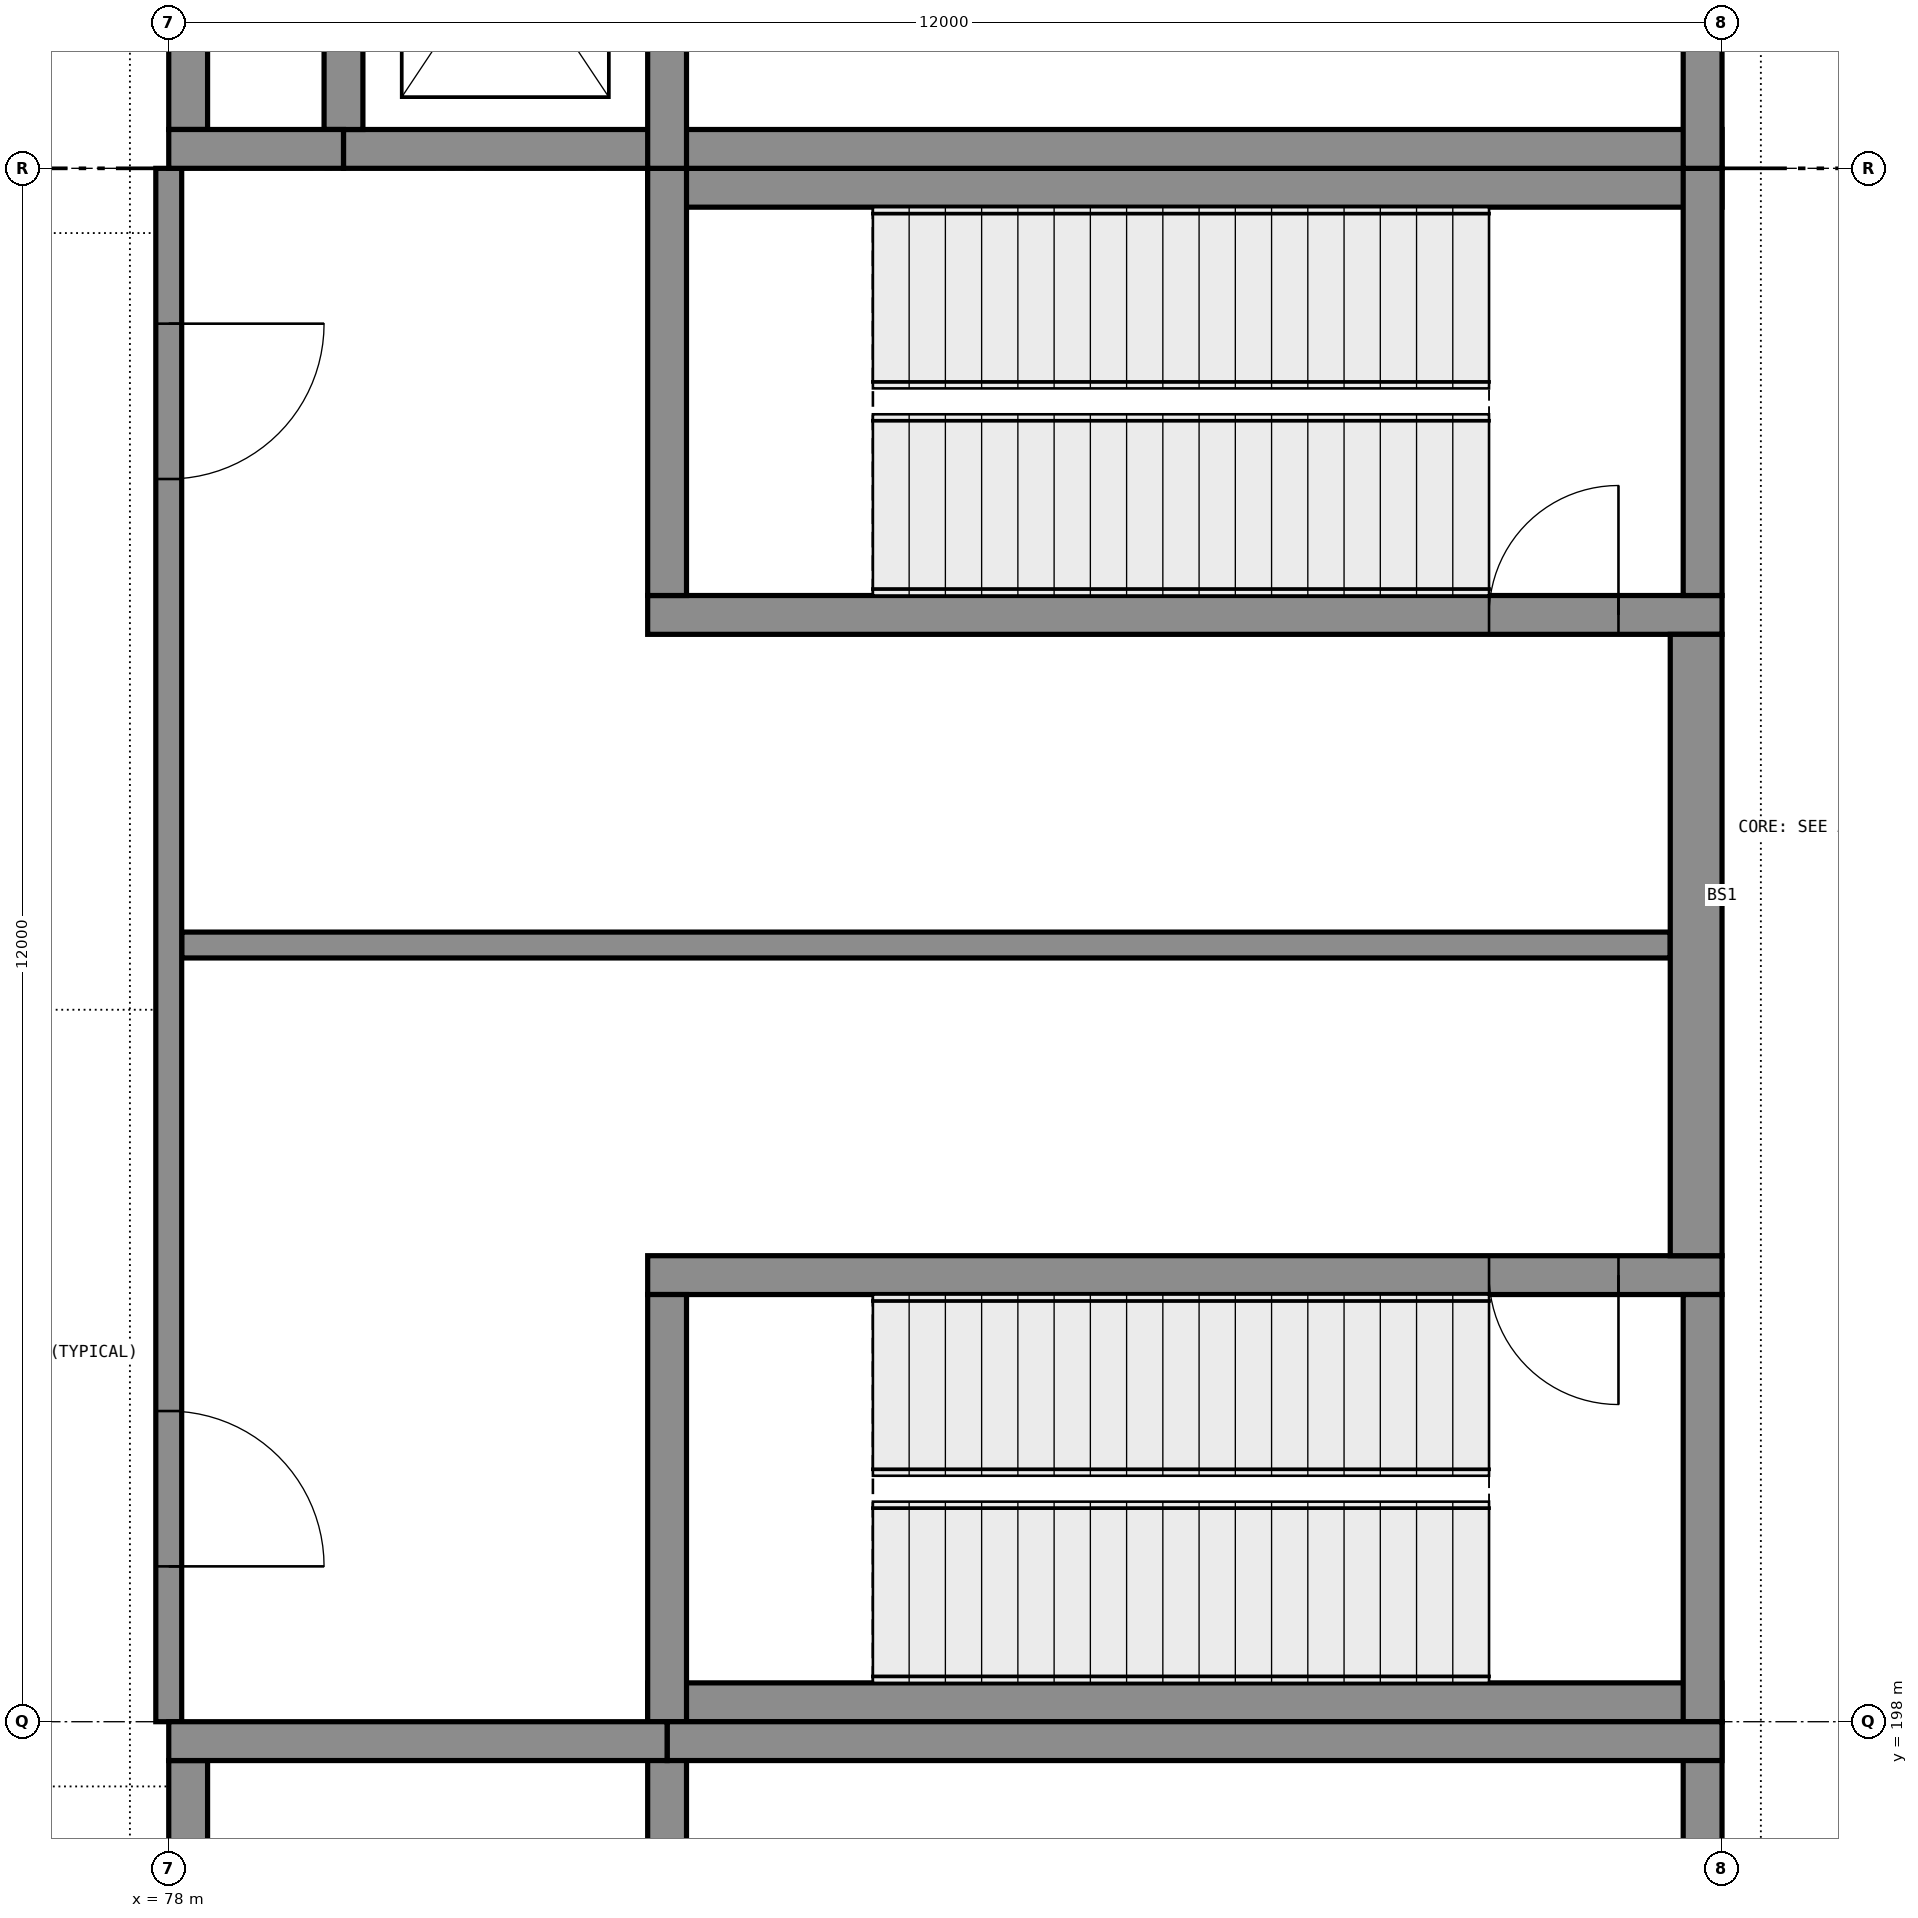
"""IFC4 building model, lengths in metres.
Left out: names, types, materials, properties, quantities, classifications, styles, units other than length and angle.
Written with IfcOpenShell. Run it as: python <this file> out.ifc"""

import sys

from ifc_helpers import new_model, si_unit, direction, frame, frame_2d, origin, place, context, subcontext, project, spatial, rectangle, extrude, element, fill, save


model = new_model("IFC4")
c1 = context("Model", 3, precision=1e-05, world=origin(), true_north=direction((0.0, 1.0)))
c2 = subcontext(c1, "Body", "Model", "MODEL_VIEW")
j1 = project(units=[si_unit("LENGTHUNIT", "METRE"), si_unit("PLANEANGLEUNIT", "RADIAN")], contexts=[c1])
p1 = place(None, origin())
s1 = spatial("IfcSite", under=j1, at=p1, CompositionType="ELEMENT")
p2 = place(p1, origin())
s2 = spatial("IfcBuilding", under=s1, at=p2, CompositionType="ELEMENT")
p3 = place(p2, frame((0.0, 0.0, -6.0)))
s3 = spatial("IfcBuildingStorey", under=s2, at=p3, CompositionType="ELEMENT", Elevation=-6.0)
p4 = place(p3, frame((90.0, 198.15, 0.0), z_axis=(0.0, 0.0, 1.0), x_axis=(-1.0, 0.0, 0.0)))
e1 = element("IfcWall", 1, at=p4, inside=s3, PredefinedType="SHEAR", context=c2, shape_type="SweptSolid", body=[
    extrude(rectangle(XDim=8.3, YDim=0.3, at=frame_2d((4.15, 0.0))), origin(), (0.0, 0.0, 1.0), 5.7),
])
p5 = place(p3, frame((90.0, 201.45, 0.0), z_axis=(0.0, 0.0, 1.0), x_axis=(-1.0, 0.0, 0.0)))
e2 = element("IfcWall", 2, at=p5, inside=s3, PredefinedType="SHEAR", context=c2, shape_type="SweptSolid", body=[
    extrude(rectangle(XDim=8.3, YDim=0.3, at=frame_2d((4.15, 0.0))), origin(), (0.0, 0.0, 1.0), 5.7),
])
p6 = place(p5, frame((0.8, 0.0, 0.0)))
e3 = element("IfcOpeningElement", 3, at=p6, cuts=e2, PredefinedType="OPENING", context=c2, shape_type="SweptSolid", body=[
    extrude(rectangle(XDim=1.0, YDim=2.1, at=frame_2d((0.5, 1.05))), frame((0.0, 0.16, 0.0), z_axis=(0.0, -1.0, 0.0), x_axis=(1.0, 0.0, 0.0)), (0.0, 0.0, 1.0), 0.32),
])
for number, where, z_axis, x_axis in (
    (4, (89.85, 198.0, 0.0), (0.0, 0.0, 1.0), (0.0, 1.0, 0.0)),
    (5, (81.85, 198.0, 0.0), (0.0, 0.0, 1.0), (0.0, 1.0, 0.0)),
):
    element("IfcWall", number, at=place(p3, frame(where, z_axis=z_axis, x_axis=x_axis)), inside=s3, PredefinedType="SHEAR", context=c2, shape_type="SweptSolid", body=[
        extrude(rectangle(XDim=3.3, YDim=0.3, at=frame_2d((1.65, 0.0))), origin(), (0.0, 0.0, 1.0), 5.7),
    ])
p7 = place(p3, frame((90.0, 206.55, 0.0), z_axis=(0.0, 0.0, 1.0), x_axis=(-1.0, 0.0, 0.0)))
e6 = element("IfcWall", 6, at=p7, inside=s3, PredefinedType="SHEAR", context=c2, shape_type="SweptSolid", body=[
    extrude(rectangle(XDim=8.3, YDim=0.3, at=frame_2d((4.15, 0.0))), origin(), (0.0, 0.0, 1.0), 5.7),
])
p8 = place(p7, frame((0.8, 0.0, 0.0)))
e7 = element("IfcOpeningElement", 7, at=p8, cuts=e6, PredefinedType="OPENING", context=c2, shape_type="SweptSolid", body=[
    extrude(rectangle(XDim=1.0, YDim=2.1, at=frame_2d((0.5, 1.05))), frame((0.0, 0.16, 0.0), z_axis=(0.0, -1.0, 0.0), x_axis=(1.0, 0.0, 0.0)), (0.0, 0.0, 1.0), 0.32),
])
p9 = place(p3, frame((90.0, 209.85, 0.0), z_axis=(0.0, 0.0, 1.0), x_axis=(-1.0, 0.0, 0.0)))
e8 = element("IfcWall", 8, at=p9, inside=s3, PredefinedType="SHEAR", context=c2, shape_type="SweptSolid", body=[
    extrude(rectangle(XDim=8.3, YDim=0.3, at=frame_2d((4.15, 0.0))), origin(), (0.0, 0.0, 1.0), 5.7),
])
for number, where, z_axis, x_axis in (
    (9, (89.85, 206.7, 0.0), (0.0, 0.0, 1.0), (0.0, 1.0, 0.0)),
    (10, (81.85, 206.7, 0.0), (0.0, 0.0, 1.0), (0.0, 1.0, 0.0)),
):
    element("IfcWall", number, at=place(p3, frame(where, z_axis=z_axis, x_axis=x_axis)), inside=s3, PredefinedType="SHEAR", context=c2, shape_type="SweptSolid", body=[
        extrude(rectangle(XDim=3.3, YDim=0.3, at=frame_2d((1.65, 0.0))), origin(), (0.0, 0.0, 1.0), 5.7),
    ])
p10 = place(p3, frame((90.0, 197.85, 0.0), z_axis=(0.0, 0.0, 1.0), x_axis=(-1.0, 0.0, 0.0)))
e11 = element("IfcWall", 11, at=p10, inside=s3, PredefinedType="SHEAR", context=c2, shape_type="SweptSolid", body=[
    extrude(rectangle(XDim=8.15, YDim=0.3, at=frame_2d((4.075, 0.0))), origin(), (0.0, 0.0, 1.0), 5.7),
])
p11 = place(p3, frame((81.85, 197.85, 0.0), z_axis=(0.0, 0.0, 1.0), x_axis=(-1.0, 0.0, 0.0)))
e12 = element("IfcWall", 12, at=p11, inside=s3, PredefinedType="SHEAR", context=c2, shape_type="SweptSolid", body=[
    extrude(rectangle(XDim=3.85, YDim=0.3, at=frame_2d((1.925, 0.0))), origin(), (0.0, 0.0, 1.0), 5.7),
])
p12 = place(p3, frame((89.85, 194.55, 0.0), z_axis=(0.0, 0.0, 1.0), x_axis=(0.0, 1.0, 0.0)))
e13 = element("IfcWall", 13, at=p12, inside=s3, PredefinedType="SHEAR", context=c2, shape_type="SweptSolid", body=[
    extrude(rectangle(XDim=3.45, YDim=0.3, at=frame_2d((1.725, 0.0))), origin(), (0.0, 0.0, 1.0), 5.7),
])
p13 = place(p3, frame((78.15, 194.55, 0.0), z_axis=(0.0, 0.0, 1.0), x_axis=(0.0, 1.0, 0.0)))
e14 = element("IfcWall", 14, at=p13, inside=s3, PredefinedType="SHEAR", context=c2, shape_type="SweptSolid", body=[
    extrude(rectangle(XDim=3.15, YDim=0.3, at=frame_2d((1.575, 0.0))), origin(), (0.0, 0.0, 1.0), 5.7),
])
p14 = place(p13, frame((1.15, 0.0, 0.0)))
e15 = element("IfcOpeningElement", 15, at=p14, cuts=e14, PredefinedType="OPENING", context=c2, shape_type="SweptSolid", body=[
    extrude(rectangle(XDim=1.0, YDim=2.1, at=frame_2d((0.5, 1.05))), frame((0.0, 0.16, 0.0), z_axis=(0.0, -1.0, 0.0), x_axis=(1.0, 0.0, 0.0)), (0.0, 0.0, 1.0), 0.32),
])
p15 = place(p3, frame((81.85, 194.7, 0.0), z_axis=(0.0, 0.0, 1.0), x_axis=(0.0, 1.0, 0.0)))
e16 = element("IfcWall", 16, at=p15, inside=s3, PredefinedType="SHEAR", context=c2, shape_type="SweptSolid", body=[
    extrude(rectangle(XDim=3.3, YDim=0.3, at=frame_2d((1.65, 0.0))), origin(), (0.0, 0.0, 1.0), 5.7),
])
p16 = place(p3, frame((90.0, 210.15, 0.0), z_axis=(0.0, 0.0, 1.0), x_axis=(-1.0, 0.0, 0.0)))
e17 = element("IfcWall", 17, at=p16, inside=s3, PredefinedType="SHEAR", context=c2, shape_type="SweptSolid", body=[
    extrude(rectangle(XDim=8.15, YDim=0.3, at=frame_2d((4.075, 0.0))), origin(), (0.0, 0.0, 1.0), 5.7),
])
p17 = place(p3, frame((81.85, 210.15, 0.0), z_axis=(0.0, 0.0, 1.0), x_axis=(-1.0, 0.0, 0.0)))
e18 = element("IfcWall", 18, at=p17, inside=s3, PredefinedType="SHEAR", context=c2, shape_type="SweptSolid", body=[
    extrude(rectangle(XDim=2.5, YDim=0.3, at=frame_2d((1.25, 0.0))), origin(), (0.0, 0.0, 1.0), 5.7),
])
p18 = place(p3, frame((79.35, 210.15, 0.0), z_axis=(0.0, 0.0, 1.0), x_axis=(-1.0, 0.0, 0.0)))
e19 = element("IfcWall", 19, at=p18, inside=s3, PredefinedType="SHEAR", context=c2, shape_type="SweptSolid", body=[
    extrude(rectangle(XDim=1.35, YDim=0.3, at=frame_2d((0.675, 0.0))), origin(), (0.0, 0.0, 1.0), 5.7),
])
p19 = place(p3, frame((89.85, 210.0, 0.0), z_axis=(0.0, 0.0, 1.0), x_axis=(0.0, 1.0, 0.0)))
e20 = element("IfcWall", 20, at=p19, inside=s3, PredefinedType="SHEAR", context=c2, shape_type="SweptSolid", body=[
    extrude(rectangle(XDim=3.45, YDim=0.3, at=frame_2d((1.725, 0.0))), origin(), (0.0, 0.0, 1.0), 5.7),
])
p20 = place(p3, frame((78.15, 210.3, 0.0), z_axis=(0.0, 0.0, 1.0), x_axis=(0.0, 1.0, 0.0)))
e21 = element("IfcWall", 21, at=p20, inside=s3, PredefinedType="SHEAR", context=c2, shape_type="SweptSolid", body=[
    extrude(rectangle(XDim=3.15, YDim=0.3, at=frame_2d((1.575, 0.0))), origin(), (0.0, 0.0, 1.0), 5.7),
])
p21 = place(p3, frame((81.85, 210.0, 0.0), z_axis=(0.0, 0.0, 1.0), x_axis=(0.0, 1.0, 0.0)))
e22 = element("IfcWall", 22, at=p21, inside=s3, PredefinedType="SHEAR", context=c2, shape_type="SweptSolid", body=[
    extrude(rectangle(XDim=3.3, YDim=0.3, at=frame_2d((1.65, 0.0))), origin(), (0.0, 0.0, 1.0), 5.7),
])
p22 = place(p3, frame((79.35, 210.3, 0.0), z_axis=(0.0, 0.0, 1.0), x_axis=(0.0, 1.0, 0.0)))
e23 = element("IfcWall", 23, at=p22, inside=s3, PredefinedType="SHEAR", context=c2, shape_type="SweptSolid", body=[
    extrude(rectangle(XDim=3.0, YDim=0.3, at=frame_2d((1.5, 0.0))), origin(), (0.0, 0.0, 1.0), 5.7),
])
p23 = place(p3, frame((89.8, 201.6, 0.0), z_axis=(0.0, 0.0, 1.0), x_axis=(0.0, 1.0, 0.0)))
e24 = element("IfcWall", 24, at=p23, inside=s3, PredefinedType="SOLIDWALL", context=c2, shape_type="SweptSolid", body=[
    extrude(rectangle(XDim=4.8, YDim=0.4, at=frame_2d((2.4, 0.0))), origin(), (0.0, 0.0, 1.0), 5.7),
])
p24 = place(p3, frame((78.1, 204.0, 0.0), z_axis=(0.0, 0.0, 1.0), x_axis=(1.0, 0.0, 0.0)))
e25 = element("IfcWall", 25, at=p24, inside=s3, PredefinedType="PARTITIONING", context=c2, shape_type="SweptSolid", body=[
    extrude(rectangle(XDim=11.5, YDim=0.2, at=frame_2d((5.75, 0.0))), origin(), (0.0, 0.0, 1.0), 5.7),
])
p25 = place(p3, frame((78.0, 198.0, 0.0), z_axis=(0.0, 0.0, 1.0), x_axis=(0.0, 1.0, 0.0)))
e26 = element("IfcWall", 26, at=p25, inside=s3, PredefinedType="PARTITIONING", context=c2, shape_type="SweptSolid", body=[
    extrude(rectangle(XDim=12.0, YDim=0.2, at=frame_2d((6.0, 0.0))), origin(), (0.0, 0.0, 1.0), 4.7),
])
p26 = place(p25, frame((1.2, 0.0, 0.0)))
e27 = element("IfcOpeningElement", 27, at=p26, cuts=e26, PredefinedType="OPENING", context=c2, shape_type="SweptSolid", body=[
    extrude(rectangle(XDim=1.2, YDim=2.1, at=frame_2d((0.6, 1.05))), frame((0.0, 0.11, 0.0), z_axis=(0.0, -1.0, 0.0), x_axis=(1.0, 0.0, 0.0)), (0.0, 0.0, 1.0), 0.22),
])
p27 = place(p25, frame((9.6, 0.0, 0.0)))
e28 = element("IfcOpeningElement", 28, at=p27, cuts=e26, PredefinedType="OPENING", context=c2, shape_type="SweptSolid", body=[
    extrude(rectangle(XDim=1.2, YDim=2.1, at=frame_2d((0.6, 1.05))), frame((0.0, 0.11, 0.0), z_axis=(0.0, -1.0, 0.0), x_axis=(1.0, 0.0, 0.0)), (0.0, 0.0, 1.0), 0.22),
])
p28 = place(p26, frame((1.2, 0.0, 0.0), z_axis=(0.0, 0.0, 1.0), x_axis=(-1.0, 0.0, 0.0)))
e29 = element("IfcDoor", 29, at=p28, inside=s3, OperationType="SINGLE_SWING_LEFT", PredefinedType="DOOR", context=c2, shape_type="SweptSolid", body=[
    extrude(rectangle(XDim=1.2, YDim=2.1, at=frame_2d((0.6, 1.05))), frame((0.0, 0.025, 0.0), z_axis=(0.0, -1.0, 0.0), x_axis=(1.0, 0.0, 0.0)), (0.0, 0.0, 1.0), 0.05),
])
fill(e27, e29)
p29 = place(p6, origin())
e30 = element("IfcDoor", 30, at=p29, inside=s3, OperationType="SINGLE_SWING_RIGHT", PredefinedType="DOOR", context=c2, shape_type="SweptSolid", body=[
    extrude(rectangle(XDim=1.0, YDim=2.1, at=frame_2d((0.5, 1.05))), frame((0.0, 0.025, 0.0), z_axis=(0.0, -1.0, 0.0), x_axis=(1.0, 0.0, 0.0)), (0.0, 0.0, 1.0), 0.05),
])
fill(e3, e30)
p30 = place(p8, frame((1.0, 0.0, 0.0), z_axis=(0.0, 0.0, 1.0), x_axis=(-1.0, 0.0, 0.0)))
e31 = element("IfcDoor", 31, at=p30, inside=s3, OperationType="SINGLE_SWING_LEFT", PredefinedType="DOOR", context=c2, shape_type="SweptSolid", body=[
    extrude(rectangle(XDim=1.0, YDim=2.1, at=frame_2d((0.5, 1.05))), frame((0.0, 0.025, 0.0), z_axis=(0.0, -1.0, 0.0), x_axis=(1.0, 0.0, 0.0)), (0.0, 0.0, 1.0), 0.05),
])
fill(e7, e31)
p31 = place(p27, frame((1.2, 0.0, 0.0), z_axis=(0.0, 0.0, 1.0), x_axis=(-1.0, 0.0, 0.0)))
e32 = element("IfcDoor", 32, at=p31, inside=s3, OperationType="SINGLE_SWING_RIGHT", PredefinedType="DOOR", context=c2, shape_type="SweptSolid", body=[
    extrude(rectangle(XDim=1.2, YDim=2.1, at=frame_2d((0.6, 1.05))), frame((0.0, 0.025, 0.0), z_axis=(0.0, -1.0, 0.0), x_axis=(1.0, 0.0, 0.0)), (0.0, 0.0, 1.0), 0.05),
])
fill(e28, e32)
save(model, sys.argv[1])
